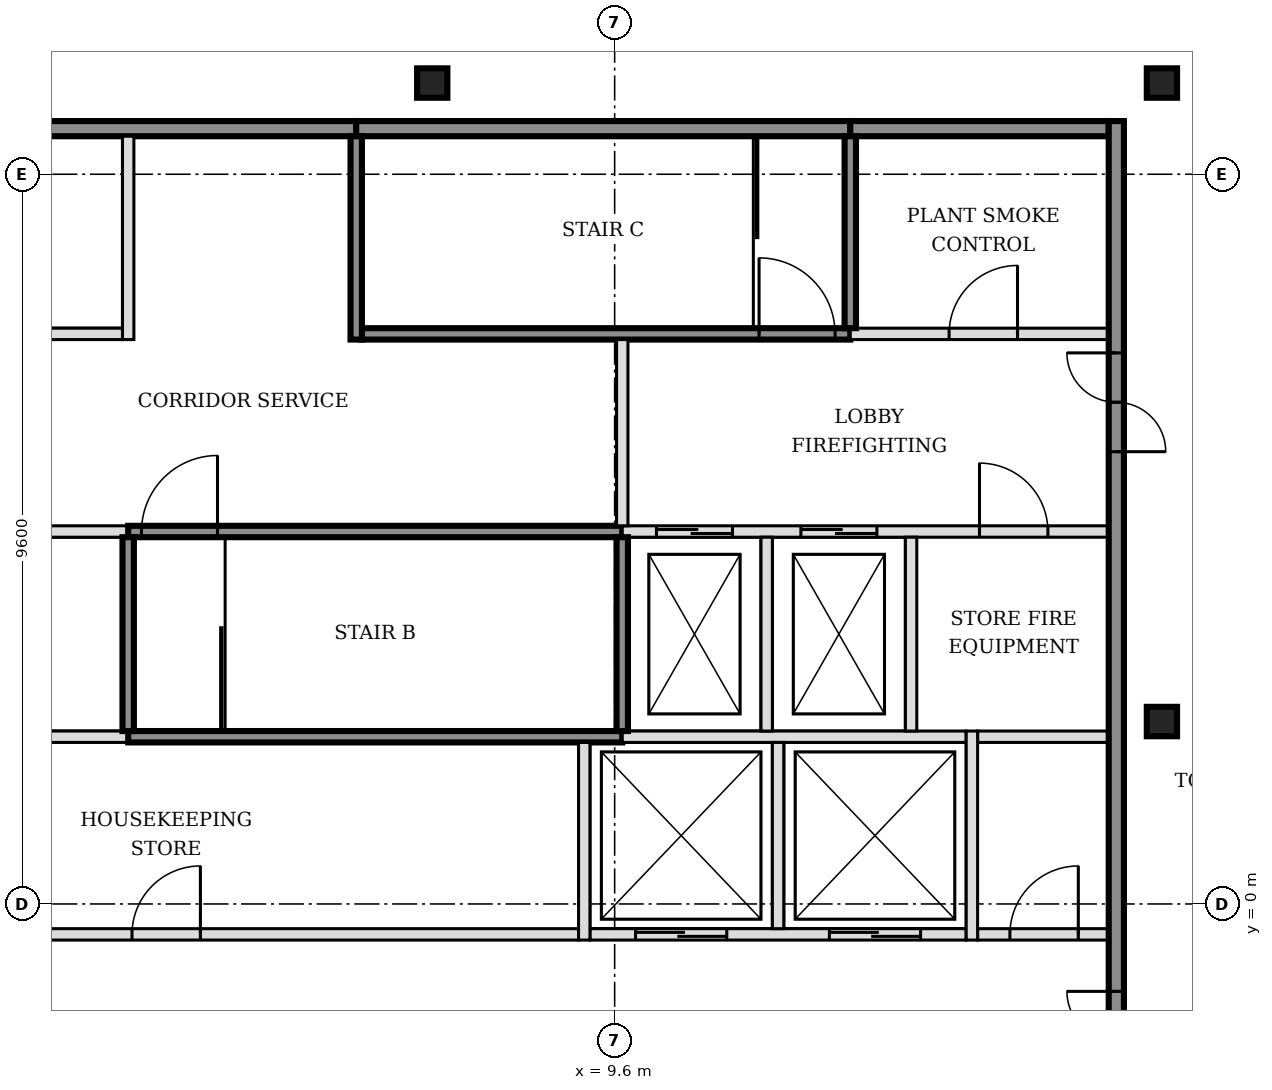
"""IFC4 building model, lengths in metres.
Left out: names, types, materials, properties, quantities, classifications, styles, units other than length and angle.
Written with IfcOpenShell. Run it as: python <this file> out.ifc"""

import sys

from ifc_helpers import new_model, si_unit, direction, frame, frame_2d, origin, origin_2d, place, context, subcontext, project, spatial, rectangle, hollow_rectangle, i_section, extrude, element, fill, save


model = new_model("IFC4")
c1 = context("Model", 3, precision=1e-05, world=origin(), true_north=direction((0.0, 1.0)))
c2 = subcontext(c1, "Body", "Model", "MODEL_VIEW")
j1 = project(units=[si_unit("LENGTHUNIT", "METRE"), si_unit("PLANEANGLEUNIT", "RADIAN")], contexts=[c1])
p1 = place(None, origin())
s1 = spatial("IfcSite", under=j1, at=p1, CompositionType="ELEMENT")
p2 = place(p1, origin())
s2 = spatial("IfcBuilding", under=s1, at=p2, CompositionType="ELEMENT")
p3 = place(p2, frame((0.0, 0.0, 295.8)))
s3 = spatial("IfcBuildingStorey", under=s2, at=p3, CompositionType="ELEMENT", Elevation=295.8)
p4 = place(p3, frame((7.2, 10.8, 5.7), z_axis=(0.0, 0.0, 1.0), x_axis=(1.0, 0.0, 0.0)))
e1 = element("IfcColumn", 1, at=p4, inside=s3, PredefinedType="COLUMN", context=c2, shape_type="SweptSolid", body=[
    extrude(hollow_rectangle(XDim=0.3, YDim=0.3, WallThickness=0.016, InnerFilletRadius=0.016, OuterFilletRadius=0.024, at=origin_2d()), origin(), (0.0, 0.0, 1.0), 6.632),
])
for number, where, z_axis, x_axis in (
    (2, (16.8, 2.4, -0.2), (0.0, 0.0, 1.0), (1.0, 0.0, 0.0)),
    (3, (7.2, 10.8, -0.2), (0.0, 0.0, 1.0), (1.0, 0.0, 0.0)),
    (4, (16.8, 10.8, -0.2), (0.0, 0.0, 1.0), (1.0, 0.0, 0.0)),
):
    element("IfcColumn", number, at=place(p3, frame(where, z_axis=z_axis, x_axis=x_axis)), inside=s3, PredefinedType="COLUMN", context=c2, shape_type="SweptSolid", body=[
        extrude(i_section(OverallWidth=0.398, OverallDepth=0.387, WebThickness=0.021, FlangeThickness=0.033, FilletRadius=0.015, at=origin_2d()), origin(), (0.0, 0.0, 1.0), 5.9),
    ])
p5 = place(p3, frame((-1.7, -0.4, 0.0), z_axis=(0.0, 0.0, 1.0), x_axis=(1.0, 0.0, 0.0)))
e5 = element("IfcWall", 5, at=p5, inside=s3, PredefinedType="PARTITIONING", context=c2, shape_type="SweptSolid", body=[
    extrude(rectangle(XDim=10.825, YDim=0.15, at=frame_2d((5.413, 0.0))), origin(), (0.0, 0.0, 1.0), 5.7),
])
p6 = place(p5, frame((4.95, 0.0, 0.0)))
e6 = element("IfcOpeningElement", 6, at=p6, cuts=e5, PredefinedType="OPENING", context=c2, shape_type="SweptSolid", body=[
    extrude(rectangle(XDim=0.9, YDim=2.1, at=frame_2d((0.45, 1.05))), frame((0.0, 0.085, 0.0), z_axis=(0.0, -1.0, 0.0), x_axis=(1.0, 0.0, 0.0)), (0.0, 0.0, 1.0), 0.17),
])
p7 = place(p3, frame((9.275, -0.4, 0.0), z_axis=(0.0, 0.0, 1.0), x_axis=(1.0, 0.0, 0.0)))
e7 = element("IfcWall", 7, at=p7, inside=s3, PredefinedType="SOLIDWALL", context=c2, shape_type="SweptSolid", body=[
    extrude(rectangle(XDim=4.95, YDim=0.15, at=frame_2d((2.475, 0.0))), origin(), (0.0, 0.0, 1.0), 5.7),
])
p8 = place(p7, frame((0.6, 0.0, 0.0)))
e8 = element("IfcOpeningElement", 8, at=p8, cuts=e7, PredefinedType="OPENING", context=c2, shape_type="SweptSolid", body=[
    extrude(rectangle(XDim=1.2, YDim=2.1, at=frame_2d((0.6, 1.05))), frame((0.0, 0.085, 0.0), z_axis=(0.0, -1.0, 0.0), x_axis=(1.0, 0.0, 0.0)), (0.0, 0.0, 1.0), 0.17),
])
p9 = place(p7, frame((3.15, 0.0, 0.0)))
e9 = element("IfcOpeningElement", 9, at=p9, cuts=e7, PredefinedType="OPENING", context=c2, shape_type="SweptSolid", body=[
    extrude(rectangle(XDim=1.2, YDim=2.1, at=frame_2d((0.6, 1.05))), frame((0.0, 0.085, 0.0), z_axis=(0.0, -1.0, 0.0), x_axis=(1.0, 0.0, 0.0)), (0.0, 0.0, 1.0), 0.17),
])
p10 = place(p3, frame((14.375, -0.4, 0.0), z_axis=(0.0, 0.0, 1.0), x_axis=(1.0, 0.0, 0.0)))
e10 = element("IfcWall", 10, at=p10, inside=s3, PredefinedType="PARTITIONING", context=c2, shape_type="SweptSolid", body=[
    extrude(rectangle(XDim=1.725, YDim=0.15, at=frame_2d((0.863, 0.0))), origin(), (0.0, 0.0, 1.0), 5.7),
])
p11 = place(p10, frame((0.425, 0.0, 0.0)))
e11 = element("IfcOpeningElement", 11, at=p11, cuts=e10, PredefinedType="OPENING", context=c2, shape_type="SweptSolid", body=[
    extrude(rectangle(XDim=0.9, YDim=2.1, at=frame_2d((0.45, 1.05))), frame((0.0, 0.085, 0.0), z_axis=(0.0, -1.0, 0.0), x_axis=(1.0, 0.0, 0.0)), (0.0, 0.0, 1.0), 0.17),
])
p12 = place(p3, frame((-1.7, 2.2, 0.0), z_axis=(0.0, 0.0, 1.0), x_axis=(1.0, 0.0, 0.0)))
e12 = element("IfcWall", 12, at=p12, inside=s3, PredefinedType="SOLIDWALL", context=c2, shape_type="SweptSolid", body=[
    extrude(rectangle(XDim=4.9, YDim=0.15, at=frame_2d((2.45, 0.0))), origin(), (0.0, 0.0, 1.0), 5.7),
])
p13 = place(p3, frame((3.2, 2.2, 0.0), z_axis=(0.0, 0.0, 1.0), x_axis=(1.0, 0.0, 0.0)))
e13 = element("IfcWall", 13, at=p13, inside=s3, PredefinedType="SOLIDWALL", context=c2, shape_type="SweptSolid", body=[
    extrude(rectangle(XDim=6.5, YDim=0.15, at=frame_2d((3.25, 0.0))), origin(), (0.0, 0.0, 1.0), 5.7),
])
p14 = place(p3, frame((9.7, 2.2, 0.0), z_axis=(0.0, 0.0, 1.0), x_axis=(1.0, 0.0, 0.0)))
e14 = element("IfcWall", 14, at=p14, inside=s3, PredefinedType="SOLIDWALL", context=c2, shape_type="SweptSolid", body=[
    extrude(rectangle(XDim=4.525, YDim=0.15, at=frame_2d((2.263, 0.0))), origin(), (0.0, 0.0, 1.0), 5.7),
])
p15 = place(p3, frame((14.375, 2.2, 0.0), z_axis=(0.0, 0.0, 1.0), x_axis=(1.0, 0.0, 0.0)))
e15 = element("IfcWall", 15, at=p15, inside=s3, PredefinedType="PARTITIONING", context=c2, shape_type="SweptSolid", body=[
    extrude(rectangle(XDim=1.725, YDim=0.15, at=frame_2d((0.863, 0.0))), origin(), (0.0, 0.0, 1.0), 5.7),
])
p16 = place(p3, frame((-1.7, 4.9, 0.0), z_axis=(0.0, 0.0, 1.0), x_axis=(1.0, 0.0, 0.0)))
e16 = element("IfcWall", 16, at=p16, inside=s3, PredefinedType="SOLIDWALL", context=c2, shape_type="SweptSolid", body=[
    extrude(rectangle(XDim=4.9, YDim=0.15, at=frame_2d((2.45, 0.0))), origin(), (0.0, 0.0, 1.0), 5.7),
])
p17 = place(p3, frame((3.2, 4.9, 0.0), z_axis=(0.0, 0.0, 1.0), x_axis=(1.0, 0.0, 0.0)))
e17 = element("IfcWall", 17, at=p17, inside=s3, PredefinedType="SOLIDWALL", context=c2, shape_type="SweptSolid", body=[
    extrude(rectangle(XDim=6.5, YDim=0.15, at=frame_2d((3.25, 0.0))), origin(), (0.0, 0.0, 1.0), 5.7),
])
p18 = place(p17, frame((0.175, 0.0, 0.0)))
e18 = element("IfcOpeningElement", 18, at=p18, cuts=e17, PredefinedType="OPENING", context=c2, shape_type="SweptSolid", body=[
    extrude(rectangle(XDim=1.0, YDim=2.1, at=frame_2d((0.5, 1.05))), frame((0.0, 0.085, 0.0), z_axis=(0.0, -1.0, 0.0), x_axis=(1.0, 0.0, 0.0)), (0.0, 0.0, 1.0), 0.17),
])
p19 = place(p3, frame((9.7, 4.9, 0.0), z_axis=(0.0, 0.0, 1.0), x_axis=(1.0, 0.0, 0.0)))
e19 = element("IfcWall", 19, at=p19, inside=s3, PredefinedType="SOLIDWALL", context=c2, shape_type="SweptSolid", body=[
    extrude(rectangle(XDim=6.4, YDim=0.15, at=frame_2d((3.2, 0.0))), origin(), (0.0, 0.0, 1.0), 5.7),
])
p20 = place(p19, frame((0.45, 0.0, 0.0)))
e20 = element("IfcOpeningElement", 20, at=p20, cuts=e19, PredefinedType="OPENING", context=c2, shape_type="SweptSolid", body=[
    extrude(rectangle(XDim=1.0, YDim=2.1, at=frame_2d((0.5, 1.05))), frame((0.0, 0.085, 0.0), z_axis=(0.0, -1.0, 0.0), x_axis=(1.0, 0.0, 0.0)), (0.0, 0.0, 1.0), 0.17),
])
p21 = place(p19, frame((2.35, 0.0, 0.0)))
e21 = element("IfcOpeningElement", 21, at=p21, cuts=e19, PredefinedType="OPENING", context=c2, shape_type="SweptSolid", body=[
    extrude(rectangle(XDim=1.0, YDim=2.1, at=frame_2d((0.5, 1.05))), frame((0.0, 0.085, 0.0), z_axis=(0.0, -1.0, 0.0), x_axis=(1.0, 0.0, 0.0)), (0.0, 0.0, 1.0), 0.17),
])
p22 = place(p19, frame((4.7, 0.0, 0.0)))
e22 = element("IfcOpeningElement", 22, at=p22, cuts=e19, PredefinedType="OPENING", context=c2, shape_type="SweptSolid", body=[
    extrude(rectangle(XDim=0.9, YDim=2.1, at=frame_2d((0.45, 1.05))), frame((0.0, 0.085, 0.0), z_axis=(0.0, -1.0, 0.0), x_axis=(1.0, 0.0, 0.0)), (0.0, 0.0, 1.0), 0.17),
])
p23 = place(p3, frame((-1.7, 7.5, 0.0), z_axis=(0.0, 0.0, 1.0), x_axis=(1.0, 0.0, 0.0)))
e23 = element("IfcWall", 23, at=p23, inside=s3, PredefinedType="SOLIDWALL", context=c2, shape_type="SweptSolid", body=[
    extrude(rectangle(XDim=4.825, YDim=0.15, at=frame_2d((2.413, 0.0))), origin(), (0.0, 0.0, 1.0), 5.7),
])
p24 = place(p3, frame((6.275, 7.5, 0.0), z_axis=(0.0, 0.0, 1.0), x_axis=(1.0, 0.0, 0.0)))
e24 = element("IfcWall", 24, at=p24, inside=s3, PredefinedType="SOLIDWALL", context=c2, shape_type="SweptSolid", body=[
    extrude(rectangle(XDim=6.425, YDim=0.15, at=frame_2d((3.212, 0.0))), origin(), (0.0, 0.0, 1.0), 5.7),
])
p25 = place(p24, frame((5.225, 0.0, 0.0)))
e25 = element("IfcOpeningElement", 25, at=p25, cuts=e24, PredefinedType="OPENING", context=c2, shape_type="SweptSolid", body=[
    extrude(rectangle(XDim=1.0, YDim=2.1, at=frame_2d((0.5, 1.05))), frame((0.0, 0.085, 0.0), z_axis=(0.0, -1.0, 0.0), x_axis=(1.0, 0.0, 0.0)), (0.0, 0.0, 1.0), 0.17),
])
p26 = place(p3, frame((12.7, 7.5, 0.0), z_axis=(0.0, 0.0, 1.0), x_axis=(1.0, 0.0, 0.0)))
e26 = element("IfcWall", 26, at=p26, inside=s3, PredefinedType="SOLIDWALL", context=c2, shape_type="SweptSolid", body=[
    extrude(rectangle(XDim=3.4, YDim=0.15, at=frame_2d((1.7, 0.0))), origin(), (0.0, 0.0, 1.0), 5.7),
])
p27 = place(p26, frame((1.3, 0.0, 0.0)))
e27 = element("IfcOpeningElement", 27, at=p27, cuts=e26, PredefinedType="OPENING", context=c2, shape_type="SweptSolid", body=[
    extrude(rectangle(XDim=0.9, YDim=2.1, at=frame_2d((0.45, 1.05))), frame((0.0, 0.085, 0.0), z_axis=(0.0, -1.0, 0.0), x_axis=(1.0, 0.0, 0.0)), (0.0, 0.0, 1.0), 0.17),
])
p28 = place(p3, frame((-1.7, 10.2, 0.0), z_axis=(0.0, 0.0, 1.0), x_axis=(1.0, 0.0, 0.0)))
e28 = element("IfcWall", 28, at=p28, inside=s3, PredefinedType="SOLIDWALL", context=c2, shape_type="SweptSolid", body=[
    extrude(rectangle(XDim=7.9, YDim=0.2, at=frame_2d((3.95, 0.0))), origin(), (0.0, 0.0, 1.0), 5.7),
])
p29 = place(p3, frame((6.2, 10.2, 0.0), z_axis=(0.0, 0.0, 1.0), x_axis=(1.0, 0.0, 0.0)))
e29 = element("IfcWall", 29, at=p29, inside=s3, PredefinedType="SOLIDWALL", context=c2, shape_type="SweptSolid", body=[
    extrude(rectangle(XDim=6.5, YDim=0.2, at=frame_2d((3.25, 0.0))), origin(), (0.0, 0.0, 1.0), 5.7),
])
p30 = place(p3, frame((12.7, 10.2, 0.0), z_axis=(0.0, 0.0, 1.0), x_axis=(1.0, 0.0, 0.0)))
e30 = element("IfcWall", 30, at=p30, inside=s3, PredefinedType="SOLIDWALL", context=c2, shape_type="SweptSolid", body=[
    extrude(rectangle(XDim=3.4, YDim=0.2, at=frame_2d((1.7, 0.0))), origin(), (0.0, 0.0, 1.0), 5.7),
])
p31 = place(p3, frame((3.2, 2.275, 0.0), z_axis=(0.0, 0.0, 1.0), x_axis=(0.0, 1.0, 0.0)))
e31 = element("IfcWall", 31, at=p31, inside=s3, PredefinedType="SOLIDWALL", context=c2, shape_type="SweptSolid", body=[
    extrude(rectangle(XDim=2.55, YDim=0.15, at=frame_2d((1.275, 0.0))), origin(), (0.0, 0.0, 1.0), 5.7),
])
for number, where, z_axis, x_axis in (
    (32, (3.2, 7.425, 0.0), (0.0, 0.0, 1.0), (0.0, 1.0, 0.0)),
    (33, (6.2, 7.425, 0.0), (0.0, 0.0, 1.0), (0.0, 1.0, 0.0)),
):
    element("IfcWall", number, at=place(p3, frame(where, z_axis=z_axis, x_axis=x_axis)), inside=s3, PredefinedType="SOLIDWALL", context=c2, shape_type="SweptSolid", body=[
        extrude(rectangle(XDim=2.675, YDim=0.15, at=frame_2d((1.337, 0.0))), origin(), (0.0, 0.0, 1.0), 5.7),
    ])
p32 = place(p3, frame((9.2, -0.475, 0.0), z_axis=(0.0, 0.0, 1.0), x_axis=(0.0, 1.0, 0.0)))
e34 = element("IfcWall", 34, at=p32, inside=s3, PredefinedType="SOLIDWALL", context=c2, shape_type="SweptSolid", body=[
    extrude(rectangle(XDim=2.6, YDim=0.15, at=frame_2d((1.3, 0.0))), origin(), (0.0, 0.0, 1.0), 5.7),
])
p33 = place(p3, frame((9.7, 2.275, 0.0), z_axis=(0.0, 0.0, 1.0), x_axis=(0.0, 1.0, 0.0)))
e35 = element("IfcWall", 35, at=p33, inside=s3, PredefinedType="SOLIDWALL", context=c2, shape_type="SweptSolid", body=[
    extrude(rectangle(XDim=2.55, YDim=0.15, at=frame_2d((1.275, 0.0))), origin(), (0.0, 0.0, 1.0), 5.7),
])
p34 = place(p3, frame((9.7, 4.975, 0.0), z_axis=(0.0, 0.0, 1.0), x_axis=(0.0, 1.0, 0.0)))
e36 = element("IfcWall", 36, at=p34, inside=s3, PredefinedType="SOLIDWALL", context=c2, shape_type="SweptSolid", body=[
    extrude(rectangle(XDim=2.45, YDim=0.15, at=frame_2d((1.225, 0.0))), origin(), (0.0, 0.0, 1.0), 5.7),
])
p35 = place(p3, frame((11.6, 2.275, 0.0), z_axis=(0.0, 0.0, 1.0), x_axis=(0.0, 1.0, 0.0)))
e37 = element("IfcWall", 37, at=p35, inside=s3, PredefinedType="SOLIDWALL", context=c2, shape_type="SweptSolid", body=[
    extrude(rectangle(XDim=2.55, YDim=0.15, at=frame_2d((1.275, 0.0))), origin(), (0.0, 0.0, 1.0), 5.7),
])
p36 = place(p3, frame((11.75, -0.325, 0.0), z_axis=(0.0, 0.0, 1.0), x_axis=(0.0, 1.0, 0.0)))
e38 = element("IfcWall", 38, at=p36, inside=s3, PredefinedType="SOLIDWALL", context=c2, shape_type="SweptSolid", body=[
    extrude(rectangle(XDim=2.45, YDim=0.15, at=frame_2d((1.225, 0.0))), origin(), (0.0, 0.0, 1.0), 5.7),
])
p37 = place(p3, frame((12.7, 7.575, 0.0), z_axis=(0.0, 0.0, 1.0), x_axis=(0.0, 1.0, 0.0)))
e39 = element("IfcWall", 39, at=p37, inside=s3, PredefinedType="SOLIDWALL", context=c2, shape_type="SweptSolid", body=[
    extrude(rectangle(XDim=2.525, YDim=0.15, at=frame_2d((1.263, 0.0))), origin(), (0.0, 0.0, 1.0), 5.7),
])
p38 = place(p3, frame((13.5, 2.275, 0.0), z_axis=(0.0, 0.0, 1.0), x_axis=(0.0, 1.0, 0.0)))
e40 = element("IfcWall", 40, at=p38, inside=s3, PredefinedType="SOLIDWALL", context=c2, shape_type="SweptSolid", body=[
    extrude(rectangle(XDim=2.55, YDim=0.15, at=frame_2d((1.275, 0.0))), origin(), (0.0, 0.0, 1.0), 5.7),
])
p39 = place(p3, frame((14.3, -0.475, 0.0), z_axis=(0.0, 0.0, 1.0), x_axis=(0.0, 1.0, 0.0)))
e41 = element("IfcWall", 41, at=p39, inside=s3, PredefinedType="SOLIDWALL", context=c2, shape_type="SweptSolid", body=[
    extrude(rectangle(XDim=2.75, YDim=0.15, at=frame_2d((1.375, 0.0))), origin(), (0.0, 0.0, 1.0), 5.7),
])
p40 = place(p3, frame((16.2, -5.5, 0.0), z_axis=(0.0, 0.0, 1.0), x_axis=(0.0, 1.0, 0.0)))
e42 = element("IfcWall", 42, at=p40, inside=s3, PredefinedType="SOLIDWALL", context=c2, shape_type="SweptSolid", body=[
    extrude(rectangle(XDim=15.8, YDim=0.2, at=frame_2d((7.9, 0.0))), origin(), (0.0, 0.0, 1.0), 5.7),
])
p41 = place(p40, frame((3.05, 0.0, 0.0)))
e43 = element("IfcOpeningElement", 43, at=p41, cuts=e42, PredefinedType="OPENING", context=c2, shape_type="SweptSolid", body=[
    extrude(rectangle(XDim=1.3, YDim=2.1, at=frame_2d((0.65, 1.05))), frame((0.0, 0.11, 0.0), z_axis=(0.0, -1.0, 0.0), x_axis=(1.0, 0.0, 0.0)), (0.0, 0.0, 1.0), 0.22),
])
p42 = place(p40, frame((11.45, 0.0, 0.0)))
e44 = element("IfcOpeningElement", 44, at=p42, cuts=e42, PredefinedType="OPENING", context=c2, shape_type="SweptSolid", body=[
    extrude(rectangle(XDim=1.3, YDim=2.1, at=frame_2d((0.65, 1.05))), frame((0.0, 0.11, 0.0), z_axis=(0.0, -1.0, 0.0), x_axis=(1.0, 0.0, 0.0)), (0.0, 0.0, 1.0), 0.22),
])
p43 = place(p8, origin())
e45 = element("IfcDoor", 45, at=p43, inside=s3, OperationType="DOUBLE_DOOR_SLIDING", PredefinedType="DOOR", context=c2, shape_type="SweptSolid", body=[
    extrude(rectangle(XDim=1.2, YDim=2.1, at=frame_2d((0.6, 1.05))), frame((0.0, 0.025, 0.0), z_axis=(0.0, -1.0, 0.0), x_axis=(1.0, 0.0, 0.0)), (0.0, 0.0, 1.0), 0.05),
])
fill(e8, e45)
p44 = place(p9, origin())
e46 = element("IfcDoor", 46, at=p44, inside=s3, OperationType="DOUBLE_DOOR_SLIDING", PredefinedType="DOOR", context=c2, shape_type="SweptSolid", body=[
    extrude(rectangle(XDim=1.2, YDim=2.1, at=frame_2d((0.6, 1.05))), frame((0.0, 0.025, 0.0), z_axis=(0.0, -1.0, 0.0), x_axis=(1.0, 0.0, 0.0)), (0.0, 0.0, 1.0), 0.05),
])
fill(e9, e46)
p45 = place(p20, origin())
e47 = element("IfcDoor", 47, at=p45, inside=s3, OperationType="DOUBLE_DOOR_SLIDING", PredefinedType="DOOR", context=c2, shape_type="SweptSolid", body=[
    extrude(rectangle(XDim=1.0, YDim=2.1, at=frame_2d((0.5, 1.05))), frame((0.0, 0.025, 0.0), z_axis=(0.0, -1.0, 0.0), x_axis=(1.0, 0.0, 0.0)), (0.0, 0.0, 1.0), 0.05),
])
fill(e20, e47)
p46 = place(p21, origin())
e48 = element("IfcDoor", 48, at=p46, inside=s3, OperationType="DOUBLE_DOOR_SLIDING", PredefinedType="DOOR", context=c2, shape_type="SweptSolid", body=[
    extrude(rectangle(XDim=1.0, YDim=2.1, at=frame_2d((0.5, 1.05))), frame((0.0, 0.025, 0.0), z_axis=(0.0, -1.0, 0.0), x_axis=(1.0, 0.0, 0.0)), (0.0, 0.0, 1.0), 0.05),
])
fill(e21, e48)
p47 = place(p18, origin())
e49 = element("IfcDoor", 49, at=p47, inside=s3, OperationType="SINGLE_SWING_RIGHT", PredefinedType="DOOR", context=c2, shape_type="SweptSolid", body=[
    extrude(rectangle(XDim=1.0, YDim=2.1, at=frame_2d((0.5, 1.05))), frame((0.0, 0.025, 0.0), z_axis=(0.0, -1.0, 0.0), x_axis=(1.0, 0.0, 0.0)), (0.0, 0.0, 1.0), 0.05),
])
fill(e18, e49)
p48 = place(p25, origin())
e50 = element("IfcDoor", 50, at=p48, inside=s3, OperationType="SINGLE_SWING_LEFT", PredefinedType="DOOR", context=c2, shape_type="SweptSolid", body=[
    extrude(rectangle(XDim=1.0, YDim=2.1, at=frame_2d((0.5, 1.05))), frame((0.0, 0.025, 0.0), z_axis=(0.0, -1.0, 0.0), x_axis=(1.0, 0.0, 0.0)), (0.0, 0.0, 1.0), 0.05),
])
fill(e25, e50)
p49 = place(p41, origin())
e51 = element("IfcDoor", 51, at=p49, inside=s3, OperationType="DOUBLE_DOOR_SINGLE_SWING", PredefinedType="DOOR", context=c2, shape_type="SweptSolid", body=[
    extrude(rectangle(XDim=1.3, YDim=2.1, at=frame_2d((0.65, 1.05))), frame((0.0, 0.025, 0.0), z_axis=(0.0, -1.0, 0.0), x_axis=(1.0, 0.0, 0.0)), (0.0, 0.0, 1.0), 0.05),
])
fill(e43, e51)
p50 = place(p42, origin())
e52 = element("IfcDoor", 52, at=p50, inside=s3, OperationType="DOUBLE_DOOR_SINGLE_SWING", PredefinedType="DOOR", context=c2, shape_type="SweptSolid", body=[
    extrude(rectangle(XDim=1.3, YDim=2.1, at=frame_2d((0.65, 1.05))), frame((0.0, 0.025, 0.0), z_axis=(0.0, -1.0, 0.0), x_axis=(1.0, 0.0, 0.0)), (0.0, 0.0, 1.0), 0.05),
])
fill(e44, e52)
p51 = place(p11, origin())
e53 = element("IfcDoor", 53, at=p51, inside=s3, OperationType="SINGLE_SWING_RIGHT", PredefinedType="DOOR", context=c2, shape_type="SweptSolid", body=[
    extrude(rectangle(XDim=0.9, YDim=2.1, at=frame_2d((0.45, 1.05))), frame((0.0, 0.025, 0.0), z_axis=(0.0, -1.0, 0.0), x_axis=(1.0, 0.0, 0.0)), (0.0, 0.0, 1.0), 0.05),
])
fill(e11, e53)
p52 = place(p22, origin())
e54 = element("IfcDoor", 54, at=p52, inside=s3, OperationType="SINGLE_SWING_LEFT", PredefinedType="DOOR", context=c2, shape_type="SweptSolid", body=[
    extrude(rectangle(XDim=0.9, YDim=2.1, at=frame_2d((0.45, 1.05))), frame((0.0, 0.025, 0.0), z_axis=(0.0, -1.0, 0.0), x_axis=(1.0, 0.0, 0.0)), (0.0, 0.0, 1.0), 0.05),
])
fill(e22, e54)
p53 = place(p27, origin())
e55 = element("IfcDoor", 55, at=p53, inside=s3, OperationType="SINGLE_SWING_RIGHT", PredefinedType="DOOR", context=c2, shape_type="SweptSolid", body=[
    extrude(rectangle(XDim=0.9, YDim=2.1, at=frame_2d((0.45, 1.05))), frame((0.0, 0.025, 0.0), z_axis=(0.0, -1.0, 0.0), x_axis=(1.0, 0.0, 0.0)), (0.0, 0.0, 1.0), 0.05),
])
fill(e27, e55)
p54 = place(p6, origin())
e56 = element("IfcDoor", 56, at=p54, inside=s3, OperationType="SINGLE_SWING_RIGHT", PredefinedType="DOOR", context=c2, shape_type="SweptSolid", body=[
    extrude(rectangle(XDim=0.9, YDim=2.1, at=frame_2d((0.45, 1.05))), frame((0.0, 0.025, 0.0), z_axis=(0.0, -1.0, 0.0), x_axis=(1.0, 0.0, 0.0)), (0.0, 0.0, 1.0), 0.05),
])
fill(e6, e56)
save(model, sys.argv[1])
